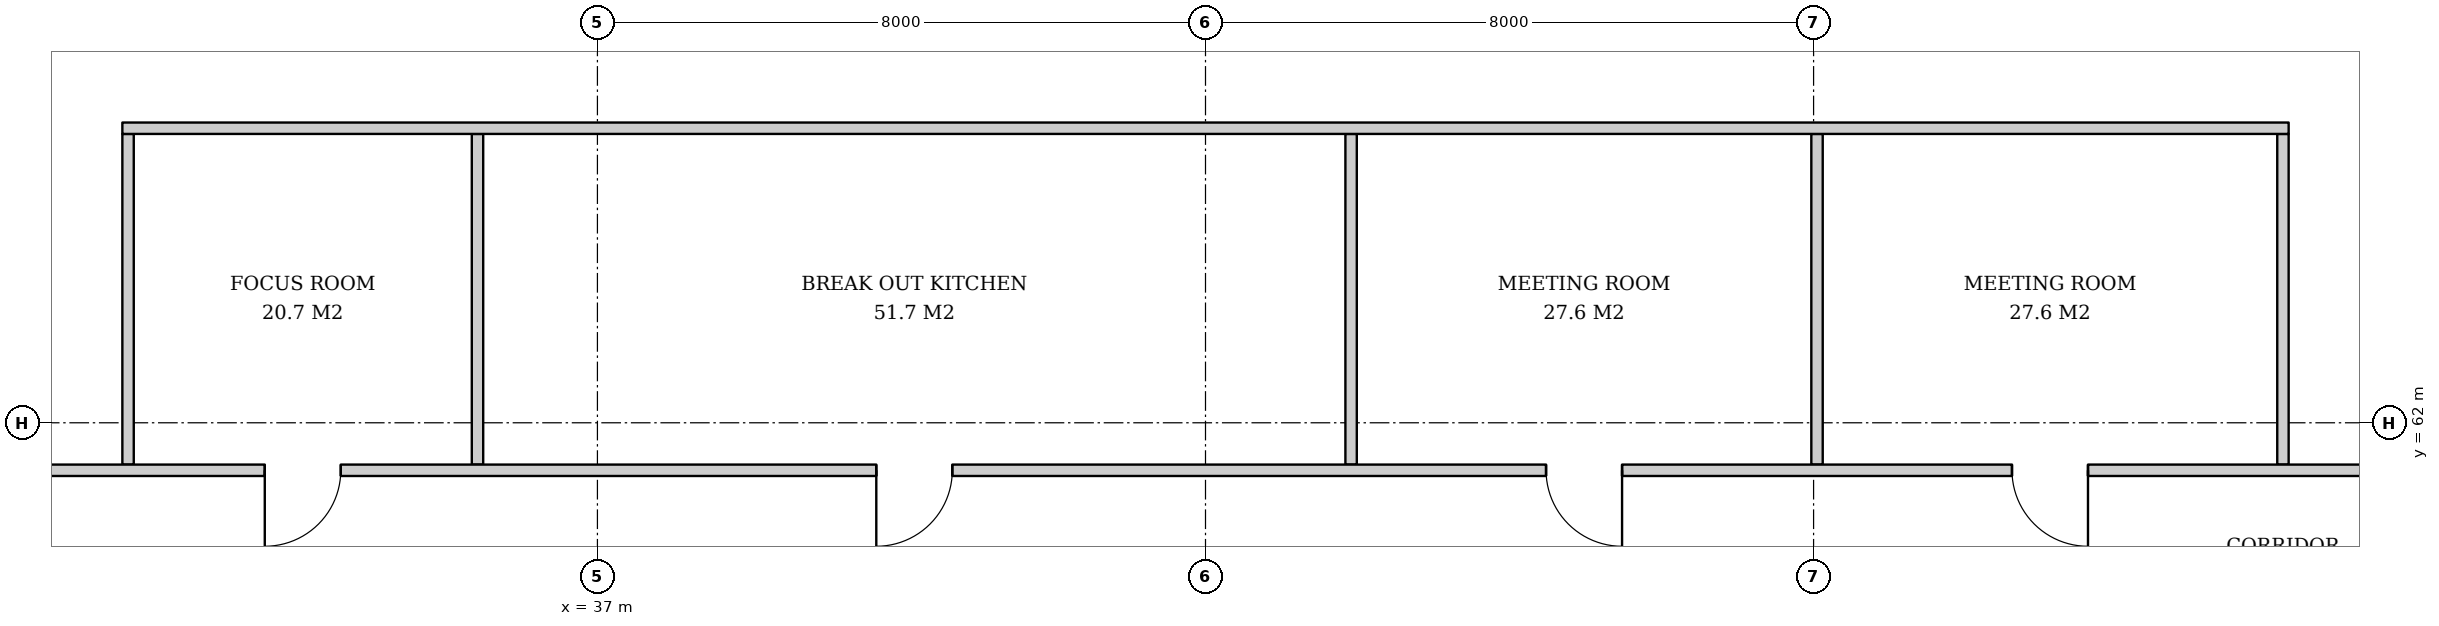
"""IFC4 building model, lengths in metres.
Left out: names, types, materials, properties, quantities, classifications, styles, units other than length and angle.
Written with IfcOpenShell. Run it as: python <this file> out.ifc"""

import sys

from ifc_helpers import new_model, si_unit, direction, frame, frame_2d, origin, place, context, subcontext, project, spatial, rectangle, extrude, element, fill, save


model = new_model("IFC4")
c1 = context("Model", 3, precision=1e-05, world=origin(), true_north=direction((0.0, 1.0)))
c2 = subcontext(c1, "Body", "Model", "MODEL_VIEW")
j1 = project(units=[si_unit("LENGTHUNIT", "METRE"), si_unit("PLANEANGLEUNIT", "RADIAN")], contexts=[c1])
p1 = place(None, origin())
s1 = spatial("IfcSite", under=j1, at=p1, CompositionType="ELEMENT")
p2 = place(p1, origin())
s2 = spatial("IfcBuilding", under=s1, at=p2, CompositionType="ELEMENT")
p3 = place(p2, frame((0.0, 0.0, 40.0)))
s3 = spatial("IfcBuildingStorey", under=s2, at=p3, CompositionType="ELEMENT", Elevation=40.0)
for number, where, z_axis, x_axis in (
    (1, (59.175, 61.45, 0.0), (0.0, 0.0, 1.0), (0.0, 1.0, 0.0)),
    (2, (53.045, 61.45, 0.0), (0.0, 0.0, 1.0), (0.0, 1.0, 0.0)),
    (3, (46.916, 61.45, 0.0), (0.0, 0.0, 1.0), (0.0, 1.0, 0.0)),
    (4, (35.422, 61.45, 0.0), (0.0, 0.0, 1.0), (0.0, 1.0, 0.0)),
    (5, (30.825, 61.45, 0.0), (0.0, 0.0, 1.0), (0.0, 1.0, 0.0)),
):
    element("IfcWall", number, at=place(p3, frame(where, z_axis=z_axis, x_axis=x_axis)), inside=s3, PredefinedType="PARTITIONING", context=c2, shape_type="SweptSolid", body=[
        extrude(rectangle(XDim=4.35, YDim=0.15, at=frame_2d((2.175, 0.0))), origin(), (0.0, 0.0, 1.0), 3.62),
    ])
p4 = place(p3, frame((59.25, 65.875, 0.0), z_axis=(0.0, 0.0, 1.0), x_axis=(-1.0, 0.0, 0.0)))
e6 = element("IfcWall", 6, at=p4, inside=s3, PredefinedType="PARTITIONING", context=c2, shape_type="SweptSolid", body=[
    extrude(rectangle(XDim=28.5, YDim=0.15, at=frame_2d((14.25, 0.0))), origin(), (0.0, 0.0, 1.0), 2.612),
])
p5 = place(p3, frame((60.45, 61.375, 0.0), z_axis=(0.0, 0.0, 1.0), x_axis=(-1.0, 0.0, 0.0)))
e7 = element("IfcWall", 7, at=p5, inside=s3, PredefinedType="PARTITIONING", context=c2, shape_type="SweptSolid", body=[
    extrude(rectangle(XDim=30.75, YDim=0.15, at=frame_2d((15.375, 0.0))), origin(), (0.0, 0.0, 1.0), 2.612),
])
p6 = place(p5, frame((3.84, 0.0, 0.0)))
e8 = element("IfcOpeningElement", 8, at=p6, cuts=e7, PredefinedType="OPENING", context=c2, shape_type="SweptSolid", body=[
    extrude(rectangle(XDim=1.0, YDim=2.1, at=frame_2d((0.5, 1.05))), frame((0.0, 0.085, 0.0), z_axis=(0.0, -1.0, 0.0), x_axis=(1.0, 0.0, 0.0)), (0.0, 0.0, 1.0), 0.17),
])
p7 = place(p5, frame((9.969, 0.0, 0.0)))
e9 = element("IfcOpeningElement", 9, at=p7, cuts=e7, PredefinedType="OPENING", context=c2, shape_type="SweptSolid", body=[
    extrude(rectangle(XDim=1.0, YDim=2.1, at=frame_2d((0.5, 1.05))), frame((0.0, 0.085, 0.0), z_axis=(0.0, -1.0, 0.0), x_axis=(1.0, 0.0, 0.0)), (0.0, 0.0, 1.0), 0.17),
])
p8 = place(p5, frame((18.781, 0.0, 0.0)))
e10 = element("IfcOpeningElement", 10, at=p8, cuts=e7, PredefinedType="OPENING", context=c2, shape_type="SweptSolid", body=[
    extrude(rectangle(XDim=1.0, YDim=2.1, at=frame_2d((0.5, 1.05))), frame((0.0, 0.085, 0.0), z_axis=(0.0, -1.0, 0.0), x_axis=(1.0, 0.0, 0.0)), (0.0, 0.0, 1.0), 0.17),
])
p9 = place(p5, frame((26.826, 0.0, 0.0)))
e11 = element("IfcOpeningElement", 11, at=p9, cuts=e7, PredefinedType="OPENING", context=c2, shape_type="SweptSolid", body=[
    extrude(rectangle(XDim=1.0, YDim=2.1, at=frame_2d((0.5, 1.05))), frame((0.0, 0.085, 0.0), z_axis=(0.0, -1.0, 0.0), x_axis=(1.0, 0.0, 0.0)), (0.0, 0.0, 1.0), 0.17),
])
p10 = place(p6, origin())
e12 = element("IfcDoor", 12, at=p10, inside=s3, OperationType="SINGLE_SWING_LEFT", PredefinedType="DOOR", context=c2, shape_type="SweptSolid", body=[
    extrude(rectangle(XDim=1.0, YDim=2.1, at=frame_2d((0.5, 1.05))), frame((0.0, 0.025, 0.0), z_axis=(0.0, -1.0, 0.0), x_axis=(1.0, 0.0, 0.0)), (0.0, 0.0, 1.0), 0.05),
])
fill(e8, e12)
p11 = place(p7, origin())
e13 = element("IfcDoor", 13, at=p11, inside=s3, OperationType="SINGLE_SWING_LEFT", PredefinedType="DOOR", context=c2, shape_type="SweptSolid", body=[
    extrude(rectangle(XDim=1.0, YDim=2.1, at=frame_2d((0.5, 1.05))), frame((0.0, 0.025, 0.0), z_axis=(0.0, -1.0, 0.0), x_axis=(1.0, 0.0, 0.0)), (0.0, 0.0, 1.0), 0.05),
])
fill(e9, e13)
p12 = place(p8, origin())
e14 = element("IfcDoor", 14, at=p12, inside=s3, OperationType="SINGLE_SWING_RIGHT", PredefinedType="DOOR", context=c2, shape_type="SweptSolid", body=[
    extrude(rectangle(XDim=1.0, YDim=2.1, at=frame_2d((0.5, 1.05))), frame((0.0, 0.025, 0.0), z_axis=(0.0, -1.0, 0.0), x_axis=(1.0, 0.0, 0.0)), (0.0, 0.0, 1.0), 0.05),
])
fill(e10, e14)
p13 = place(p9, origin())
e15 = element("IfcDoor", 15, at=p13, inside=s3, OperationType="SINGLE_SWING_RIGHT", PredefinedType="DOOR", context=c2, shape_type="SweptSolid", body=[
    extrude(rectangle(XDim=1.0, YDim=2.1, at=frame_2d((0.5, 1.05))), frame((0.0, 0.025, 0.0), z_axis=(0.0, -1.0, 0.0), x_axis=(1.0, 0.0, 0.0)), (0.0, 0.0, 1.0), 0.05),
])
fill(e11, e15)
save(model, sys.argv[1])
